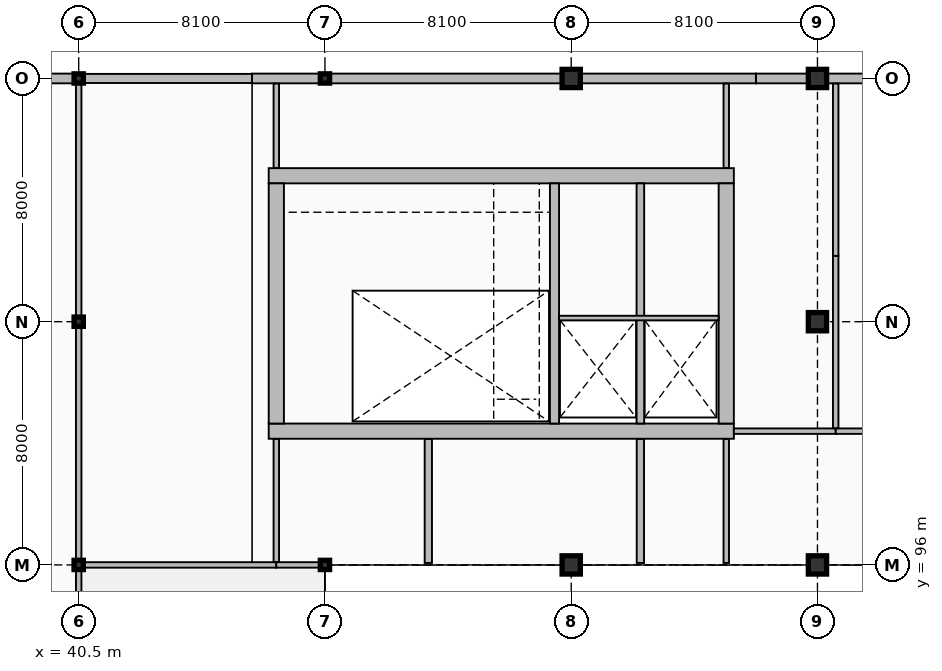
"""IFC4 building model, lengths in metres.
Left out: names, types, materials, properties, quantities, classifications, styles, units other than length and angle.
Written with IfcOpenShell. Run it as: python <this file> out.ifc"""

import sys

from ifc_helpers import new_model, si_unit, direction, frame, frame_2d, origin, origin_2d, place, context, subcontext, project, spatial, rectangle, hollow_rectangle, extrude, element, fill, save


model = new_model("IFC4")
c1 = context("Model", 3, precision=1e-05, world=origin(), true_north=direction((0.0, 1.0)))
c2 = subcontext(c1, "Body", "Model", "MODEL_VIEW")
j1 = project(units=[si_unit("LENGTHUNIT", "METRE"), si_unit("PLANEANGLEUNIT", "RADIAN")], contexts=[c1])
p1 = place(None, origin())
s1 = spatial("IfcSite", under=j1, at=p1, CompositionType="ELEMENT")
p2 = place(p1, origin())
s2 = spatial("IfcBuilding", under=s1, at=p2, CompositionType="ELEMENT")
p3 = place(p2, frame((0.0, 0.0, 14.7)))
s3 = spatial("IfcBuildingStorey", under=s2, at=p3, CompositionType="ELEMENT", Elevation=14.7)
p4 = place(p3, frame((46.75, 100.4, 0.0), z_axis=(0.0, 0.0, 1.0), x_axis=(1.0, 0.0, 0.0)))
e1 = element("IfcWall", 1, at=p4, inside=s3, PredefinedType="SHEAR", context=c2, shape_type="SweptSolid", body=[
    extrude(rectangle(XDim=15.3, YDim=0.5, at=frame_2d((7.65, 0.0))), origin(), (0.0, 0.0, 1.0), 5.1),
])
p5 = place(p4, frame((1.0, 0.0, 0.0)))
e2 = element("IfcOpeningElement", 2, at=p5, cuts=e1, PredefinedType="OPENING", context=c2, shape_type="SweptSolid", body=[
    extrude(rectangle(XDim=1.15, YDim=2.25, at=frame_2d((0.575, 1.125))), frame((0.0, 0.26, 0.0), z_axis=(0.0, -1.0, 0.0), x_axis=(1.0, 0.0, 0.0)), (0.0, 0.0, 1.0), 0.52),
])
p6 = place(p4, frame((10.282, 0.0, 0.0)))
e3 = element("IfcOpeningElement", 3, at=p6, cuts=e1, PredefinedType="OPENING", context=c2, shape_type="SweptSolid", body=[
    extrude(rectangle(XDim=1.1, YDim=2.2, at=frame_2d((0.55, 1.1))), frame((0.0, 0.26, 0.0), z_axis=(0.0, -1.0, 0.0), x_axis=(1.0, 0.0, 0.0)), (0.0, 0.0, 1.0), 0.52),
])
p7 = place(p4, frame((12.998, 0.0, 0.0)))
e4 = element("IfcOpeningElement", 4, at=p7, cuts=e1, PredefinedType="OPENING", context=c2, shape_type="SweptSolid", body=[
    extrude(rectangle(XDim=1.1, YDim=2.2, at=frame_2d((0.55, 1.1))), frame((0.0, 0.26, 0.0), z_axis=(0.0, -1.0, 0.0), x_axis=(1.0, 0.0, 0.0)), (0.0, 0.0, 1.0), 0.52),
])
p8 = place(p3, frame((46.75, 108.8, 0.0), z_axis=(0.0, 0.0, 1.0), x_axis=(1.0, 0.0, 0.0)))
e5 = element("IfcWall", 5, at=p8, inside=s3, PredefinedType="SHEAR", context=c2, shape_type="SweptSolid", body=[
    extrude(rectangle(XDim=15.3, YDim=0.5, at=frame_2d((7.65, 0.0))), origin(), (0.0, 0.0, 1.0), 5.1),
])
for number, where, z_axis, x_axis in (
    (6, (47.0, 100.65, 0.0), (0.0, 0.0, 1.0), (0.0, 1.0, 0.0)),
    (7, (61.8, 100.65, 0.0), (0.0, 0.0, 1.0), (0.0, 1.0, 0.0)),
):
    element("IfcWall", number, at=place(p3, frame(where, z_axis=z_axis, x_axis=x_axis)), inside=s3, PredefinedType="SHEAR", context=c2, shape_type="SweptSolid", body=[
        extrude(rectangle(XDim=7.9, YDim=0.5, at=frame_2d((3.95, 0.0))), origin(), (0.0, 0.0, 1.0), 5.1),
    ])
p9 = place(p3, frame((56.15, 100.65, 0.0), z_axis=(0.0, 0.0, 1.0), x_axis=(0.0, 1.0, 0.0)))
e8 = element("IfcWall", 8, at=p9, inside=s3, PredefinedType="SHEAR", context=c2, shape_type="SweptSolid", body=[
    extrude(rectangle(XDim=7.9, YDim=0.3, at=frame_2d((3.95, 0.0))), origin(), (0.0, 0.0, 1.0), 5.1),
])
p10 = place(p3, frame((58.975, 100.65, 0.0), z_axis=(0.0, 0.0, 1.0), x_axis=(0.0, 1.0, 0.0)))
e9 = element("IfcWall", 9, at=p10, inside=s3, PredefinedType="SHEAR", context=c2, shape_type="SweptSolid", body=[
    extrude(rectangle(XDim=7.9, YDim=0.25, at=frame_2d((3.95, 0.0))), origin(), (0.0, 0.0, 1.0), 5.1),
])
for number, where, z_axis, x_axis in (
    (10, (40.5, 96.0, 0.0), (0.0, 0.0, 1.0), (1.0, 0.0, 0.0)),
    (11, (40.5, 104.0, 0.0), (0.0, 0.0, 1.0), (1.0, 0.0, 0.0)),
    (12, (40.5, 112.0, 0.0), (0.0, 0.0, 1.0), (1.0, 0.0, 0.0)),
    (13, (48.6, 96.0, 0.0), (0.0, 0.0, 1.0), (1.0, 0.0, 0.0)),
    (14, (48.6, 112.0, 0.0), (0.0, 0.0, 1.0), (1.0, 0.0, 0.0)),
):
    element("IfcColumn", number, at=place(p3, frame(where, z_axis=z_axis, x_axis=x_axis)), inside=s3, PredefinedType="COLUMN", context=c2, shape_type="SweptSolid", body=[
        extrude(hollow_rectangle(XDim=0.305, YDim=0.305, WallThickness=0.016, InnerFilletRadius=0.016, OuterFilletRadius=0.032, at=origin_2d()), origin(), (0.0, 0.0, 1.0), 5.1),
    ])
for number, where, z_axis, x_axis in (
    (15, (56.7, 96.0, 0.0), (0.0, 0.0, 1.0), (1.0, 0.0, 0.0)),
    (16, (56.7, 112.0, 0.0), (0.0, 0.0, 1.0), (1.0, 0.0, 0.0)),
    (17, (64.8, 96.0, 0.0), (0.0, 0.0, 1.0), (1.0, 0.0, 0.0)),
    (18, (64.8, 104.0, 0.0), (0.0, 0.0, 1.0), (1.0, 0.0, 0.0)),
    (19, (64.8, 112.0, 0.0), (0.0, 0.0, 1.0), (1.0, 0.0, 0.0)),
):
    element("IfcColumn", number, at=place(p3, frame(where, z_axis=z_axis, x_axis=x_axis)), inside=s3, PredefinedType="COLUMN", context=c2, shape_type="SweptSolid", body=[
        extrude(rectangle(XDim=0.6, YDim=0.6, at=origin_2d()), origin(), (0.0, 0.0, 1.0), 5.1),
    ])
p11 = place(p3, frame((76.95, 112.0, 0.0), z_axis=(0.0, 0.0, 1.0), x_axis=(-1.0, 0.0, 0.0)))
e20 = element("IfcWall", 20, at=p11, inside=s3, PredefinedType="SOLIDWALL", context=c2, shape_type="SweptSolid", body=[
    extrude(rectangle(XDim=14.175, YDim=0.32, at=frame_2d((7.087, 0.0))), origin(), (0.0, 0.0, 1.0), 4.232),
])
p12 = place(p11, frame((5.85, 0.0, 0.95)))
e21 = element("IfcOpeningElement", 21, at=p12, cuts=e20, PredefinedType="OPENING", context=c2, shape_type="SweptSolid", body=[
    extrude(rectangle(XDim=2.4, YDim=1.6, at=frame_2d((1.2, 0.8))), frame((0.0, 0.17, 0.0), z_axis=(0.0, -1.0, 0.0), x_axis=(1.0, 0.0, 0.0)), (0.0, 0.0, 1.0), 0.34),
])
p13 = place(p3, frame((62.775, 112.0, 0.0), z_axis=(0.0, 0.0, 1.0), x_axis=(-1.0, 0.0, 0.0)))
e22 = element("IfcWall", 22, at=p13, inside=s3, PredefinedType="SOLIDWALL", context=c2, shape_type="SweptSolid", body=[
    extrude(rectangle(XDim=14.175, YDim=0.32, at=frame_2d((7.087, 0.0))), origin(), (0.0, 0.0, 1.0), 4.232),
])
p14 = place(p13, frame((8.1, 0.0, 0.95)))
e23 = element("IfcOpeningElement", 23, at=p14, cuts=e22, PredefinedType="OPENING", context=c2, shape_type="SweptSolid", body=[
    extrude(rectangle(XDim=2.7, YDim=1.8, at=frame_2d((1.35, 0.9))), frame((0.0, 0.17, 0.0), z_axis=(0.0, -1.0, 0.0), x_axis=(1.0, 0.0, 0.0)), (0.0, 0.0, 1.0), 0.34),
])
p15 = place(p3, frame((48.6, 112.0, 0.0), z_axis=(0.0, 0.0, 1.0), x_axis=(-1.0, 0.0, 0.0)))
e24 = element("IfcWall", 24, at=p15, inside=s3, PredefinedType="SOLIDWALL", context=c2, shape_type="SweptSolid", body=[
    extrude(rectangle(XDim=2.4, YDim=0.32, at=frame_2d((1.2, 0.0))), origin(), (0.0, 0.0, 1.0), 4.232),
])
p16 = place(p3, frame((46.2, 112.0, 0.0), z_axis=(0.0, 0.0, 1.0), x_axis=(-1.0, 0.0, 0.0)))
e25 = element("IfcWall", 25, at=p16, inside=s3, PredefinedType="SOLIDWALL", context=c2, shape_type="SweptSolid", body=[
    extrude(rectangle(XDim=5.7, YDim=0.3, at=frame_2d((2.85, 0.0))), origin(), (0.0, 0.0, 1.0), 4.232),
])
p17 = place(p16, frame((1.35, 0.0, 0.85)))
e26 = element("IfcOpeningElement", 26, at=p17, cuts=e25, PredefinedType="OPENING", context=c2, shape_type="SweptSolid", body=[
    extrude(rectangle(XDim=2.7, YDim=2.1, at=frame_2d((1.35, 1.05))), frame((0.0, 0.16, 0.0), z_axis=(0.0, -1.0, 0.0), x_axis=(1.0, 0.0, 0.0)), (0.0, 0.0, 1.0), 0.32),
])
p18 = place(p3, frame((40.5, 112.0, 0.0), z_axis=(0.0, 0.0, 1.0), x_axis=(-1.0, 0.0, 0.0)))
e27 = element("IfcWall", 27, at=p18, inside=s3, PredefinedType="SOLIDWALL", context=c2, shape_type="SweptSolid", body=[
    extrude(rectangle(XDim=12.15, YDim=0.32, at=frame_2d((6.075, 0.0))), origin(), (0.0, 0.0, 1.0), 4.232),
])
p19 = place(p3, frame((56.3, 104.12, 0.0), z_axis=(0.0, 0.0, 1.0), x_axis=(1.0, 0.0, 0.0)))
e28 = element("IfcWall", 28, at=p19, inside=s3, PredefinedType="PARTITIONING", context=c2, shape_type="SweptSolid", body=[
    extrude(rectangle(XDim=5.25, YDim=0.15, at=frame_2d((2.625, 0.0))), origin(), (0.0, 0.0, 1.0), 4.84),
])
p20 = place(p3, frame((40.66, 96.0, 0.0), z_axis=(0.0, 0.0, 1.0), x_axis=(1.0, 0.0, 0.0)))
e29 = element("IfcWall", 29, at=p20, inside=s3, PredefinedType="PARTITIONING", context=c2, shape_type="SweptSolid", body=[
    extrude(rectangle(XDim=6.34, YDim=0.18, at=frame_2d((3.17, 0.0))), origin(), (0.0, 0.0, 1.0), 4.299),
])
p21 = place(p3, frame((47.0, 96.0, 0.0), z_axis=(0.0, 0.0, 1.0), x_axis=(1.0, 0.0, 0.0)))
e30 = element("IfcWall", 30, at=p21, inside=s3, PredefinedType="PARTITIONING", context=c2, shape_type="SweptSolid", body=[
    extrude(rectangle(XDim=1.44, YDim=0.18, at=frame_2d((0.72, 0.0))), origin(), (0.0, 0.0, 1.0), 4.299),
])
p22 = place(p3, frame((62.05, 100.4, 0.0), z_axis=(0.0, 0.0, 1.0), x_axis=(1.0, 0.0, 0.0)))
e31 = element("IfcWall", 31, at=p22, inside=s3, PredefinedType="PARTITIONING", context=c2, shape_type="SweptSolid", body=[
    extrude(rectangle(XDim=3.35, YDim=0.18, at=frame_2d((1.675, 0.0))), origin(), (0.0, 0.0, 1.0), 4.84),
])
p23 = place(p22, frame((1.075, 0.0, 0.0)))
e32 = element("IfcOpeningElement", 32, at=p23, cuts=e31, PredefinedType="OPENING", context=c2, shape_type="SweptSolid", body=[
    extrude(rectangle(XDim=1.2, YDim=2.2, at=frame_2d((0.6, 1.1))), frame((0.0, 0.1, 0.0), z_axis=(0.0, -1.0, 0.0), x_axis=(1.0, 0.0, 0.0)), (0.0, 0.0, 1.0), 0.2),
])
p24 = place(p3, frame((65.4, 100.4, 0.0), z_axis=(0.0, 0.0, 1.0), x_axis=(1.0, 0.0, 0.0)))
e33 = element("IfcWall", 33, at=p24, inside=s3, PredefinedType="PARTITIONING", context=c2, shape_type="SweptSolid", body=[
    extrude(rectangle(XDim=19.1, YDim=0.18, at=frame_2d((9.55, 0.0))), origin(), (0.0, 0.0, 1.0), 4.84),
])
p25 = place(p24, frame((8.95, 0.0, 0.0)))
e34 = element("IfcOpeningElement", 34, at=p25, cuts=e33, PredefinedType="OPENING", context=c2, shape_type="SweptSolid", body=[
    extrude(rectangle(XDim=1.2, YDim=2.3, at=frame_2d((0.6, 1.15))), frame((0.0, 0.1, 0.0), z_axis=(0.0, -1.0, 0.0), x_axis=(1.0, 0.0, 0.0)), (0.0, 0.0, 1.0), 0.2),
])
p26 = place(p3, frame((40.5, 88.16, 0.0), z_axis=(0.0, 0.0, 1.0), x_axis=(0.0, 1.0, 0.0)))
e35 = element("IfcWall", 35, at=p26, inside=s3, PredefinedType="PARTITIONING", context=c2, shape_type="SweptSolid", body=[
    extrude(rectangle(XDim=7.679, YDim=0.18, at=frame_2d((3.84, 0.0))), origin(), (0.0, 0.0, 1.0), 4.369),
])
p27 = place(p26, frame((3.29, 0.0, 0.0)))
e36 = element("IfcOpeningElement", 36, at=p27, cuts=e35, PredefinedType="OPENING", context=c2, shape_type="SweptSolid", body=[
    extrude(rectangle(XDim=1.1, YDim=2.2, at=frame_2d((0.55, 1.1))), frame((0.0, 0.1, 0.0), z_axis=(0.0, -1.0, 0.0), x_axis=(1.0, 0.0, 0.0)), (0.0, 0.0, 1.0), 0.2),
])
p28 = place(p3, frame((40.5, 96.16, 0.0), z_axis=(0.0, 0.0, 1.0), x_axis=(0.0, 1.0, 0.0)))
e37 = element("IfcWall", 37, at=p28, inside=s3, PredefinedType="PARTITIONING", context=c2, shape_type="SweptSolid", body=[
    extrude(rectangle(XDim=7.679, YDim=0.18, at=frame_2d((3.84, 0.0))), origin(), (0.0, 0.0, 1.0), 4.332),
])
p29 = place(p28, frame((3.24, 0.0, 0.0)))
e38 = element("IfcOpeningElement", 38, at=p29, cuts=e37, PredefinedType="OPENING", context=c2, shape_type="SweptSolid", body=[
    extrude(rectangle(XDim=1.2, YDim=2.2, at=frame_2d((0.6, 1.1))), frame((0.0, 0.1, 0.0), z_axis=(0.0, -1.0, 0.0), x_axis=(1.0, 0.0, 0.0)), (0.0, 0.0, 1.0), 0.2),
])
p30 = place(p3, frame((40.5, 104.16, 0.0), z_axis=(0.0, 0.0, 1.0), x_axis=(0.0, 1.0, 0.0)))
e39 = element("IfcWall", 39, at=p30, inside=s3, PredefinedType="PARTITIONING", context=c2, shape_type="SweptSolid", body=[
    extrude(rectangle(XDim=7.672, YDim=0.18, at=frame_2d((3.836, 0.0))), origin(), (0.0, 0.0, 1.0), 4.369),
])
p31 = place(p3, frame((47.0, 96.098, 0.0), z_axis=(0.0, 0.0, 1.0), x_axis=(0.0, 1.0, 0.0)))
e40 = element("IfcWall", 40, at=p31, inside=s3, PredefinedType="PARTITIONING", context=c2, shape_type="SweptSolid", body=[
    extrude(rectangle(XDim=4.044, YDim=0.18, at=frame_2d((2.022, 0.0))), origin(), (0.0, 0.0, 1.0), 4.84),
])
p32 = place(p31, frame((1.472, 0.0, 0.0)))
e41 = element("IfcOpeningElement", 41, at=p32, cuts=e40, PredefinedType="OPENING", context=c2, shape_type="SweptSolid", body=[
    extrude(rectangle(XDim=1.1, YDim=2.2, at=frame_2d((0.55, 1.1))), frame((0.0, 0.1, 0.0), z_axis=(0.0, -1.0, 0.0), x_axis=(1.0, 0.0, 0.0)), (0.0, 0.0, 1.0), 0.2),
])
p33 = place(p3, frame((47.0, 109.058, 0.0), z_axis=(0.0, 0.0, 1.0), x_axis=(0.0, 1.0, 0.0)))
e42 = element("IfcWall", 42, at=p33, inside=s3, PredefinedType="PARTITIONING", context=c2, shape_type="SweptSolid", body=[
    extrude(rectangle(XDim=2.774, YDim=0.18, at=frame_2d((1.387, 0.0))), origin(), (0.0, 0.0, 1.0), 4.84),
])
p34 = place(p33, frame((0.837, 0.0, 0.0)))
e43 = element("IfcOpeningElement", 43, at=p34, cuts=e42, PredefinedType="OPENING", context=c2, shape_type="SweptSolid", body=[
    extrude(rectangle(XDim=1.1, YDim=2.2, at=frame_2d((0.55, 1.1))), frame((0.0, 0.1, 0.0), z_axis=(0.0, -1.0, 0.0), x_axis=(1.0, 0.0, 0.0)), (0.0, 0.0, 1.0), 0.2),
])
p35 = place(p3, frame((52.0, 96.065, 0.0), z_axis=(0.0, 0.0, 1.0), x_axis=(0.0, 1.0, 0.0)))
e44 = element("IfcWall", 44, at=p35, inside=s3, PredefinedType="PARTITIONING", context=c2, shape_type="SweptSolid", body=[
    extrude(rectangle(XDim=4.077, YDim=0.24, at=frame_2d((2.039, 0.0))), origin(), (0.0, 0.0, 1.0), 4.84),
])
p36 = place(p35, frame((1.438, 0.0, 0.0)))
e45 = element("IfcOpeningElement", 45, at=p36, cuts=e44, PredefinedType="OPENING", context=c2, shape_type="SweptSolid", body=[
    extrude(rectangle(XDim=1.2, YDim=2.3, at=frame_2d((0.6, 1.15))), frame((0.0, 0.13, 0.0), z_axis=(0.0, -1.0, 0.0), x_axis=(1.0, 0.0, 0.0)), (0.0, 0.0, 1.0), 0.26),
])
p37 = place(p3, frame((58.975, 96.065, 0.0), z_axis=(0.0, 0.0, 1.0), x_axis=(0.0, 1.0, 0.0)))
e46 = element("IfcWall", 46, at=p37, inside=s3, PredefinedType="PARTITIONING", context=c2, shape_type="SweptSolid", body=[
    extrude(rectangle(XDim=4.077, YDim=0.24, at=frame_2d((2.039, 0.0))), origin(), (0.0, 0.0, 1.0), 4.84),
])
p38 = place(p3, frame((61.8, 96.065, 0.0), z_axis=(0.0, 0.0, 1.0), x_axis=(0.0, 1.0, 0.0)))
e47 = element("IfcWall", 47, at=p38, inside=s3, PredefinedType="PARTITIONING", context=c2, shape_type="SweptSolid", body=[
    extrude(rectangle(XDim=4.077, YDim=0.18, at=frame_2d((2.039, 0.0))), origin(), (0.0, 0.0, 1.0), 4.84),
])
p39 = place(p38, frame((1.489, 0.0, 0.0)))
e48 = element("IfcOpeningElement", 48, at=p39, cuts=e47, PredefinedType="OPENING", context=c2, shape_type="SweptSolid", body=[
    extrude(rectangle(XDim=1.1, YDim=2.2, at=frame_2d((0.55, 1.1))), frame((0.0, 0.1, 0.0), z_axis=(0.0, -1.0, 0.0), x_axis=(1.0, 0.0, 0.0)), (0.0, 0.0, 1.0), 0.2),
])
p40 = place(p3, frame((61.8, 109.058, 0.0), z_axis=(0.0, 0.0, 1.0), x_axis=(0.0, 1.0, 0.0)))
e49 = element("IfcWall", 49, at=p40, inside=s3, PredefinedType="PARTITIONING", context=c2, shape_type="SweptSolid", body=[
    extrude(rectangle(XDim=2.774, YDim=0.18, at=frame_2d((1.387, 0.0))), origin(), (0.0, 0.0, 1.0), 4.84),
])
p41 = place(p40, frame((0.837, 0.0, 0.0)))
e50 = element("IfcOpeningElement", 50, at=p41, cuts=e49, PredefinedType="OPENING", context=c2, shape_type="SweptSolid", body=[
    extrude(rectangle(XDim=1.1, YDim=2.2, at=frame_2d((0.55, 1.1))), frame((0.0, 0.1, 0.0), z_axis=(0.0, -1.0, 0.0), x_axis=(1.0, 0.0, 0.0)), (0.0, 0.0, 1.0), 0.2),
])
for number, where, z_axis, x_axis in (
    (51, (65.4, 100.498, 0.0), (0.0, 0.0, 1.0), (0.0, 1.0, 0.0)),
    (52, (65.4, 106.165, 0.0), (0.0, 0.0, 1.0), (0.0, 1.0, 0.0)),
):
    element("IfcWall", number, at=place(p3, frame(where, z_axis=z_axis, x_axis=x_axis)), inside=s3, PredefinedType="PARTITIONING", context=c2, shape_type="SweptSolid", body=[
        extrude(rectangle(XDim=5.667, YDim=0.18, at=frame_2d((2.833, 0.0))), origin(), (0.0, 0.0, 1.0), 4.84),
    ])
p42 = place(p14, origin())
e53 = element("IfcWindow", 53, at=p42, inside=s3, PartitioningType="TRIPLE_PANEL_VERTICAL", PredefinedType="WINDOW", context=c2, shape_type="SweptSolid", body=[
    extrude(rectangle(XDim=2.7, YDim=1.8, at=frame_2d((1.35, 0.9))), frame((0.0, 0.03, 0.0), z_axis=(0.0, -1.0, 0.0), x_axis=(1.0, 0.0, 0.0)), (0.0, 0.0, 1.0), 0.06),
])
fill(e23, e53)
p43 = place(p17, origin())
e54 = element("IfcWindow", 54, at=p43, inside=s3, PartitioningType="TRIPLE_PANEL_VERTICAL", PredefinedType="WINDOW", context=c2, shape_type="SweptSolid", body=[
    extrude(rectangle(XDim=2.7, YDim=2.1, at=frame_2d((1.35, 1.05))), frame((0.0, 0.03, 0.0), z_axis=(0.0, -1.0, 0.0), x_axis=(1.0, 0.0, 0.0)), (0.0, 0.0, 1.0), 0.06),
])
fill(e26, e54)
p44 = place(p5, origin())
e55 = element("IfcDoor", 55, at=p44, inside=s3, OperationType="SINGLE_SWING_LEFT", PredefinedType="DOOR", context=c2, shape_type="SweptSolid", body=[
    extrude(rectangle(XDim=1.15, YDim=2.25, at=frame_2d((0.575, 1.125))), frame((0.0, 0.025, 0.0), z_axis=(0.0, -1.0, 0.0), x_axis=(1.0, 0.0, 0.0)), (0.0, 0.0, 1.0), 0.05),
])
fill(e2, e55)
p45 = place(p6, frame((1.1, 0.0, 0.0), z_axis=(0.0, 0.0, 1.0), x_axis=(-1.0, 0.0, 0.0)))
e56 = element("IfcDoor", 56, at=p45, inside=s3, OperationType="DOUBLE_DOOR_SLIDING", PredefinedType="DOOR", context=c2, shape_type="SweptSolid", body=[
    extrude(rectangle(XDim=1.1, YDim=2.2, at=frame_2d((0.55, 1.1))), frame((0.0, 0.025, 0.0), z_axis=(0.0, -1.0, 0.0), x_axis=(1.0, 0.0, 0.0)), (0.0, 0.0, 1.0), 0.05),
])
fill(e3, e56)
p46 = place(p7, frame((1.1, 0.0, 0.0), z_axis=(0.0, 0.0, 1.0), x_axis=(-1.0, 0.0, 0.0)))
e57 = element("IfcDoor", 57, at=p46, inside=s3, OperationType="DOUBLE_DOOR_SLIDING", PredefinedType="DOOR", context=c2, shape_type="SweptSolid", body=[
    extrude(rectangle(XDim=1.1, YDim=2.2, at=frame_2d((0.55, 1.1))), frame((0.0, 0.025, 0.0), z_axis=(0.0, -1.0, 0.0), x_axis=(1.0, 0.0, 0.0)), (0.0, 0.0, 1.0), 0.05),
])
fill(e4, e57)
p47 = place(p23, frame((1.2, 0.0, 0.0), z_axis=(0.0, 0.0, 1.0), x_axis=(-1.0, 0.0, 0.0)))
e58 = element("IfcDoor", 58, at=p47, inside=s3, OperationType="SINGLE_SWING_RIGHT", PredefinedType="DOOR", context=c2, shape_type="SweptSolid", body=[
    extrude(rectangle(XDim=1.2, YDim=2.2, at=frame_2d((0.6, 1.1))), frame((0.0, 0.025, 0.0), z_axis=(0.0, -1.0, 0.0), x_axis=(1.0, 0.0, 0.0)), (0.0, 0.0, 1.0), 0.05),
])
fill(e32, e58)
p48 = place(p29, frame((1.2, 0.0, 0.0), z_axis=(0.0, 0.0, 1.0), x_axis=(-1.0, 0.0, 0.0)))
e59 = element("IfcDoor", 59, at=p48, inside=s3, OperationType="SINGLE_SWING_RIGHT", PredefinedType="DOOR", context=c2, shape_type="SweptSolid", body=[
    extrude(rectangle(XDim=1.2, YDim=2.2, at=frame_2d((0.6, 1.1))), frame((0.0, 0.025, 0.0), z_axis=(0.0, -1.0, 0.0), x_axis=(1.0, 0.0, 0.0)), (0.0, 0.0, 1.0), 0.05),
])
fill(e38, e59)
p49 = place(p32, origin())
e60 = element("IfcDoor", 60, at=p49, inside=s3, OperationType="SINGLE_SWING_LEFT", PredefinedType="DOOR", context=c2, shape_type="SweptSolid", body=[
    extrude(rectangle(XDim=1.1, YDim=2.2, at=frame_2d((0.55, 1.1))), frame((0.0, 0.025, 0.0), z_axis=(0.0, -1.0, 0.0), x_axis=(1.0, 0.0, 0.0)), (0.0, 0.0, 1.0), 0.05),
])
fill(e41, e60)
p50 = place(p34, frame((1.1, 0.0, 0.0), z_axis=(0.0, 0.0, 1.0), x_axis=(-1.0, 0.0, 0.0)))
e61 = element("IfcDoor", 61, at=p50, inside=s3, OperationType="SINGLE_SWING_RIGHT", PredefinedType="DOOR", context=c2, shape_type="SweptSolid", body=[
    extrude(rectangle(XDim=1.1, YDim=2.2, at=frame_2d((0.55, 1.1))), frame((0.0, 0.025, 0.0), z_axis=(0.0, -1.0, 0.0), x_axis=(1.0, 0.0, 0.0)), (0.0, 0.0, 1.0), 0.05),
])
fill(e43, e61)
p51 = place(p36, origin())
e62 = element("IfcDoor", 62, at=p51, inside=s3, OperationType="SINGLE_SWING_LEFT", PredefinedType="DOOR", context=c2, shape_type="SweptSolid", body=[
    extrude(rectangle(XDim=1.2, YDim=2.3, at=frame_2d((0.6, 1.15))), frame((0.0, 0.025, 0.0), z_axis=(0.0, -1.0, 0.0), x_axis=(1.0, 0.0, 0.0)), (0.0, 0.0, 1.0), 0.05),
])
fill(e45, e62)
p52 = place(p39, frame((1.1, 0.0, 0.0), z_axis=(0.0, 0.0, 1.0), x_axis=(-1.0, 0.0, 0.0)))
e63 = element("IfcDoor", 63, at=p52, inside=s3, OperationType="SINGLE_SWING_RIGHT", PredefinedType="DOOR", context=c2, shape_type="SweptSolid", body=[
    extrude(rectangle(XDim=1.1, YDim=2.2, at=frame_2d((0.55, 1.1))), frame((0.0, 0.025, 0.0), z_axis=(0.0, -1.0, 0.0), x_axis=(1.0, 0.0, 0.0)), (0.0, 0.0, 1.0), 0.05),
])
fill(e48, e63)
p53 = place(p41, origin())
e64 = element("IfcDoor", 64, at=p53, inside=s3, OperationType="SINGLE_SWING_LEFT", PredefinedType="DOOR", context=c2, shape_type="SweptSolid", body=[
    extrude(rectangle(XDim=1.1, YDim=2.2, at=frame_2d((0.55, 1.1))), frame((0.0, 0.025, 0.0), z_axis=(0.0, -1.0, 0.0), x_axis=(1.0, 0.0, 0.0)), (0.0, 0.0, 1.0), 0.05),
])
fill(e50, e64)
save(model, sys.argv[1])
